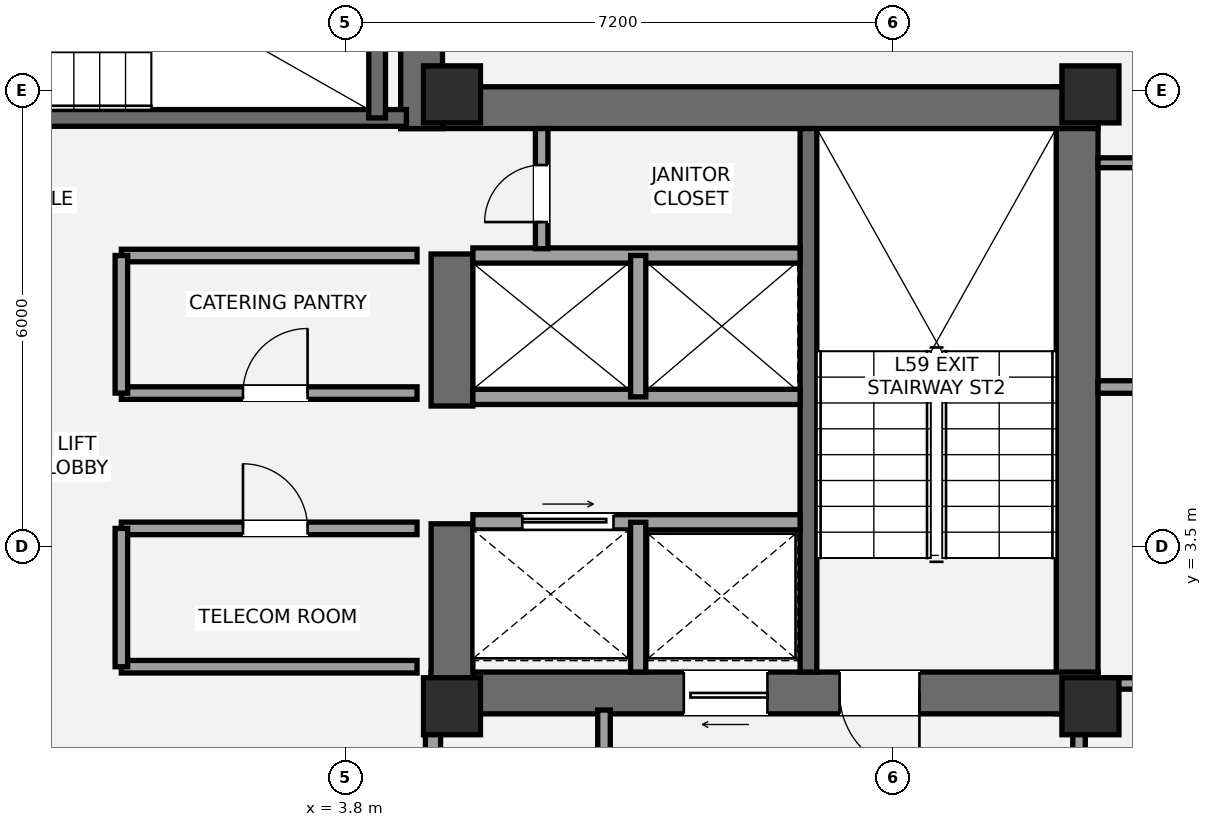
"""IFC4 building model, lengths in metres.
Left out: names, types, materials, properties, quantities, classifications, styles, units other than length and angle.
Written with IfcOpenShell. Run it as: python <this file> out.ifc"""

import sys

from ifc_helpers import new_model, si_unit, direction, frame, frame_2d, origin, origin_2d, place, context, subcontext, project, spatial, rectangle, extrude, element, fill, save


model = new_model("IFC4")
c1 = context("Model", 3, precision=1e-05, world=origin(), true_north=direction((0.0, 1.0)))
c2 = subcontext(c1, "Body", "Model", "MODEL_VIEW")
j1 = project(units=[si_unit("LENGTHUNIT", "METRE"), si_unit("PLANEANGLEUNIT", "RADIAN")], contexts=[c1])
p1 = place(None, origin())
s1 = spatial("IfcSite", under=j1, at=p1, CompositionType="ELEMENT")
p2 = place(p1, origin())
s2 = spatial("IfcBuilding", under=s1, at=p2, CompositionType="ELEMENT")
p3 = place(p2, frame((0.0, 0.0, 213.15)))
s3 = spatial("IfcBuildingStorey", under=s2, at=p3, CompositionType="ELEMENT", Elevation=213.15)
p4 = place(p3, frame((13.425, 1.3, 0.0), z_axis=(0.0, 0.0, 1.0), x_axis=(0.0, 1.0, 0.0)))
e1 = element("IfcWall", 1, at=p4, inside=s3, PredefinedType="SHEAR", context=c2, shape_type="SweptSolid", body=[
    extrude(rectangle(XDim=8.25, YDim=0.55, at=frame_2d((4.125, 0.0))), origin(), (0.0, 0.0, 1.0), 3.15),
])
p5 = place(p3, frame((4.525, 9.275, 0.0), z_axis=(0.0, 0.0, 1.0), x_axis=(1.0, 0.0, 0.0)))
e2 = element("IfcWall", 2, at=p5, inside=s3, PredefinedType="SHEAR", context=c2, shape_type="SweptSolid", body=[
    extrude(rectangle(XDim=9.175, YDim=0.55, at=frame_2d((4.587, 0.0))), origin(), (0.0, 0.0, 1.0), 3.15),
])
p6 = place(p3, frame((13.7, 1.575, 0.0), z_axis=(0.0, 0.0, 1.0), x_axis=(-1.0, 0.0, 0.0)))
e3 = element("IfcWall", 3, at=p6, inside=s3, PredefinedType="SHEAR", context=c2, shape_type="SweptSolid", body=[
    extrude(rectangle(XDim=8.775, YDim=0.55, at=frame_2d((4.387, 0.0))), origin(), (0.0, 0.0, 1.0), 3.15),
])
p7 = place(p6, frame((2.35, 0.0, 0.0)))
e4 = element("IfcOpeningElement", 4, at=p7, cuts=e3, PredefinedType="OPENING", context=c2, shape_type="SweptSolid", body=[
    extrude(rectangle(XDim=1.05, YDim=2.15, at=frame_2d((0.525, 1.075))), frame((0.0, 0.285, 0.0), z_axis=(0.0, -1.0, 0.0), x_axis=(1.0, 0.0, 0.0)), (0.0, 0.0, 1.0), 0.57),
])
p8 = place(p6, frame((4.35, 0.0, 0.0)))
e5 = element("IfcOpeningElement", 5, at=p8, cuts=e3, PredefinedType="OPENING", context=c2, shape_type="SweptSolid", body=[
    extrude(rectangle(XDim=1.1, YDim=2.2, at=frame_2d((0.55, 1.1))), frame((0.0, 0.285, 0.0), z_axis=(0.0, -1.0, 0.0), x_axis=(1.0, 0.0, 0.0)), (0.0, 0.0, 1.0), 0.57),
])
p9 = place(p3, frame((5.2, 1.3, 0.0), z_axis=(0.0, 0.0, 1.0), x_axis=(0.0, 1.0, 0.0)))
e6 = element("IfcWall", 6, at=p9, inside=s3, PredefinedType="SHEAR", context=c2, shape_type="SweptSolid", body=[
    extrude(rectangle(XDim=2.5, YDim=0.55, at=frame_2d((1.25, 0.0))), origin(), (0.0, 0.0, 1.0), 3.15),
])
p10 = place(p3, frame((5.2, 5.35, 0.0), z_axis=(0.0, 0.0, 1.0), x_axis=(0.0, 1.0, 0.0)))
e7 = element("IfcWall", 7, at=p10, inside=s3, PredefinedType="SHEAR", context=c2, shape_type="SweptSolid", body=[
    extrude(rectangle(XDim=2.0, YDim=0.55, at=frame_2d((1.0, 0.0))), origin(), (0.0, 0.0, 1.0), 3.15),
])
p11 = place(p3, frame((9.89, 1.85, 0.0), z_axis=(0.0, 0.0, 1.0), x_axis=(0.0, 1.0, 0.0)))
e8 = element("IfcWall", 8, at=p11, inside=s3, PredefinedType="SHEAR", context=c2, shape_type="SweptSolid", body=[
    extrude(rectangle(XDim=7.15, YDim=0.22, at=frame_2d((3.575, 0.0))), origin(), (0.0, 0.0, 1.0), 3.15),
])
p12 = place(p3, frame((4.8, 9.0, 0.0), z_axis=(0.0, 0.0, 1.0), x_axis=(0.0, 1.0, 0.0)))
e9 = element("IfcWall", 9, at=p12, inside=s3, PredefinedType="SHEAR", context=c2, shape_type="SweptSolid", body=[
    extrude(rectangle(XDim=3.95, YDim=0.55, at=frame_2d((1.975, 0.0))), origin(), (0.0, 0.0, 1.0), 3.15),
])
p13 = place(p3, frame((-4.7, 9.14, 0.0), z_axis=(0.0, 0.0, 1.0), x_axis=(1.0, 0.0, 0.0)))
e10 = element("IfcWall", 10, at=p13, inside=s3, PredefinedType="SHEAR", context=c2, shape_type="SweptSolid", body=[
    extrude(rectangle(XDim=9.3, YDim=0.22, at=frame_2d((4.65, 0.0))), origin(), (0.0, 0.0, 1.0), 3.15),
])
p14 = place(p13, frame((1.15, 0.0, 0.0)))
e11 = element("IfcOpeningElement", 11, at=p14, cuts=e10, PredefinedType="OPENING", context=c2, shape_type="SweptSolid", body=[
    extrude(rectangle(XDim=1.05, YDim=2.15, at=frame_2d((0.525, 1.075))), frame((0.0, 0.12, 0.0), z_axis=(0.0, -1.0, 0.0), x_axis=(1.0, 0.0, 0.0)), (0.0, 0.0, 1.0), 0.24),
])
p15 = place(p3, frame((4.215, 9.14, 0.0), z_axis=(0.0, 0.0, 1.0), x_axis=(0.0, 1.0, 0.0)))
e12 = element("IfcWall", 12, at=p15, inside=s3, PredefinedType="SHEAR", context=c2, shape_type="SweptSolid", body=[
    extrude(rectangle(XDim=3.26, YDim=0.22, at=frame_2d((1.63, 0.0))), origin(), (0.0, 0.0, 1.0), 3.15),
])
for number, where, z_axis, x_axis in (
    (13, (5.2, 1.4, 0.0), (0.0, 0.0, 1.0), (1.0, 0.0, 0.0)),
    (14, (5.2, 9.45, 0.0), (0.0, 0.0, 1.0), (1.0, 0.0, 0.0)),
    (15, (13.6, 1.4, 0.0), (0.0, 0.0, 1.0), (1.0, 0.0, 0.0)),
    (16, (13.6, 9.45, 0.0), (0.0, 0.0, 1.0), (1.0, 0.0, 0.0)),
):
    element("IfcColumn", number, at=place(p3, frame(where, z_axis=z_axis, x_axis=x_axis)), inside=s3, PredefinedType="PILASTER", context=c2, shape_type="SweptSolid", body=[
        extrude(rectangle(XDim=0.75, YDim=0.75, at=origin_2d()), origin(), (0.0, 0.0, 1.0), 3.15),
    ])
p16 = place(p3, frame((13.907, 11.413, 0.0), z_axis=(0.0, 0.0, 1.0), x_axis=(0.827592777121, -0.561328954586, 0.0)))
e17 = element("IfcWall", 17, at=p16, inside=s3, PredefinedType="STANDARD", context=c2, shape_type="SweptSolid", body=[
    extrude(rectangle(XDim=3.704, YDim=0.44, at=frame_2d((1.852, 0.0))), origin(), (0.0, 0.0, 1.0), 2.336),
])
p17 = place(p16, frame((1.958, 0.0, 0.58)))
e18 = element("IfcOpeningElement", 18, at=p17, cuts=e17, PredefinedType="OPENING", context=c2, shape_type="SweptSolid", body=[
    extrude(rectangle(XDim=1.4, YDim=1.55, at=frame_2d((0.7, 0.775))), frame((0.0, 0.23, 0.0), z_axis=(0.0, -1.0, 0.0), x_axis=(1.0, 0.0, 0.0)), (0.0, 0.0, 1.0), 0.46),
])
p18 = place(p3, frame((7.2, -2.15, 0.0), z_axis=(0.0, 0.0, 1.0), x_axis=(0.0, 1.0, 0.0)))
e19 = element("IfcWall", 19, at=p18, inside=s3, PredefinedType="PARTITIONING", context=c2, shape_type="SweptSolid", body=[
    extrude(rectangle(XDim=3.5, YDim=0.165, at=frame_2d((1.75, 0.0))), origin(), (0.0, 0.0, 1.0), 2.423),
])
p19 = place(p3, frame((13.45, -2.15, 0.0), z_axis=(0.0, 0.0, 1.0), x_axis=(0.0, 1.0, 0.0)))
e20 = element("IfcWall", 20, at=p19, inside=s3, PredefinedType="PARTITIONING", context=c2, shape_type="SweptSolid", body=[
    extrude(rectangle(XDim=3.5, YDim=0.165, at=frame_2d((1.75, 0.0))), origin(), (0.0, 0.0, 1.0), 2.423),
])
p20 = place(p19, frame((0.67, 0.0, 0.0)))
e21 = element("IfcOpeningElement", 21, at=p20, cuts=e20, PredefinedType="OPENING", context=c2, shape_type="SweptSolid", body=[
    extrude(rectangle(XDim=1.05, YDim=2.15, at=frame_2d((0.525, 1.075))), frame((0.0, 0.093, 0.0), z_axis=(0.0, -1.0, 0.0), x_axis=(1.0, 0.0, 0.0)), (0.0, 0.0, 1.0), 0.185),
])
p21 = place(p3, frame((4.95, -2.15, 0.0), z_axis=(0.0, 0.0, 1.0), x_axis=(0.0, 1.0, 0.0)))
e22 = element("IfcWall", 22, at=p21, inside=s3, PredefinedType="SOLIDWALL", context=c2, shape_type="SweptSolid", body=[
    extrude(rectangle(XDim=3.5, YDim=0.2, at=frame_2d((1.75, 0.0))), origin(), (0.0, 0.0, 1.0), 2.423),
])
p22 = place(p21, frame((0.95, 0.0, 0.0)))
e23 = element("IfcOpeningElement", 23, at=p22, cuts=e22, PredefinedType="OPENING", context=c2, shape_type="SweptSolid", body=[
    extrude(rectangle(XDim=0.75, YDim=2.1, at=frame_2d((0.375, 1.05))), frame((0.0, 0.11, 0.0), z_axis=(0.0, -1.0, 0.0), x_axis=(1.0, 0.0, 0.0)), (0.0, 0.0, 1.0), 0.22),
])
p23 = place(p3, frame((5.475, 3.82, 0.0), z_axis=(0.0, 0.0, 1.0), x_axis=(1.0, 0.0, 0.0)))
e24 = element("IfcWall", 24, at=p23, inside=s3, PredefinedType="SOLIDWALL", context=c2, shape_type="SweptSolid", body=[
    extrude(rectangle(XDim=4.305, YDim=0.2, at=frame_2d((2.152, 0.0))), origin(), (0.0, 0.0, 1.0), 2.97),
])
p24 = place(p23, frame((0.65, 0.0, 0.0)))
e25 = element("IfcOpeningElement", 25, at=p24, cuts=e24, PredefinedType="OPENING", context=c2, shape_type="SweptSolid", body=[
    extrude(rectangle(XDim=1.2, YDim=2.2, at=frame_2d((0.6, 1.1))), frame((0.0, 0.11, 0.0), z_axis=(0.0, -1.0, 0.0), x_axis=(1.0, 0.0, 0.0)), (0.0, 0.0, 1.0), 0.22),
])
p25 = place(p3, frame((7.65, 1.85, 0.0), z_axis=(0.0, 0.0, 1.0), x_axis=(0.0, 1.0, 0.0)))
e26 = element("IfcWall", 26, at=p25, inside=s3, PredefinedType="SOLIDWALL", context=c2, shape_type="SweptSolid", body=[
    extrude(rectangle(XDim=1.97, YDim=0.2, at=frame_2d((0.985, 0.0))), origin(), (0.0, 0.0, 1.0), 2.97),
])
for number, where, z_axis, x_axis in (
    (27, (5.475, 5.47, 0.0), (0.0, 0.0, 1.0), (1.0, 0.0, 0.0)),
    (28, (5.475, 7.33, 0.0), (0.0, 0.0, 1.0), (1.0, 0.0, 0.0)),
):
    element("IfcWall", number, at=place(p3, frame(where, z_axis=z_axis, x_axis=x_axis)), inside=s3, PredefinedType="SOLIDWALL", context=c2, shape_type="SweptSolid", body=[
        extrude(rectangle(XDim=4.305, YDim=0.2, at=frame_2d((2.152, 0.0))), origin(), (0.0, 0.0, 1.0), 2.97),
    ])
p26 = place(p3, frame((7.65, 5.47, 0.0), z_axis=(0.0, 0.0, 1.0), x_axis=(0.0, 1.0, 0.0)))
e29 = element("IfcWall", 29, at=p26, inside=s3, PredefinedType="SOLIDWALL", context=c2, shape_type="SweptSolid", body=[
    extrude(rectangle(XDim=1.86, YDim=0.2, at=frame_2d((0.93, 0.0))), origin(), (0.0, 0.0, 1.0), 2.97),
])
p27 = place(p3, frame((0.85, 1.92, 0.0), z_axis=(0.0, 0.0, 1.0), x_axis=(1.0, 0.0, 0.0)))
e30 = element("IfcWall", 30, at=p27, inside=s3, PredefinedType="PARTITIONING", context=c2, shape_type="SweptSolid", body=[
    extrude(rectangle(XDim=3.89, YDim=0.165, at=frame_2d((1.945, 0.0))), origin(), (0.0, 0.0, 1.0), 2.11),
])
p28 = place(p3, frame((0.85, 3.74, 0.0), z_axis=(0.0, 0.0, 1.0), x_axis=(1.0, 0.0, 0.0)))
e31 = element("IfcWall", 31, at=p28, inside=s3, PredefinedType="PARTITIONING", context=c2, shape_type="SweptSolid", body=[
    extrude(rectangle(XDim=3.89, YDim=0.165, at=frame_2d((1.945, 0.0))), origin(), (0.0, 0.0, 1.0), 2.97),
])
p29 = place(p28, frame((1.6, 0.0, 0.0)))
e32 = element("IfcOpeningElement", 32, at=p29, cuts=e31, PredefinedType="OPENING", context=c2, shape_type="SweptSolid", body=[
    extrude(rectangle(XDim=0.85, YDim=2.1, at=frame_2d((0.425, 1.05))), frame((0.0, 0.093, 0.0), z_axis=(0.0, -1.0, 0.0), x_axis=(1.0, 0.0, 0.0)), (0.0, 0.0, 1.0), 0.185),
])
p30 = place(p3, frame((0.85, 1.92, 0.0), z_axis=(0.0, 0.0, 1.0), x_axis=(0.0, 1.0, 0.0)))
e33 = element("IfcWall", 33, at=p30, inside=s3, PredefinedType="PARTITIONING", context=c2, shape_type="SweptSolid", body=[
    extrude(rectangle(XDim=1.82, YDim=0.165, at=frame_2d((0.91, 0.0))), origin(), (0.0, 0.0, 1.0), 2.97),
])
p31 = place(p3, frame((0.85, 5.52, 0.0), z_axis=(0.0, 0.0, 1.0), x_axis=(1.0, 0.0, 0.0)))
e34 = element("IfcWall", 34, at=p31, inside=s3, PredefinedType="PARTITIONING", context=c2, shape_type="SweptSolid", body=[
    extrude(rectangle(XDim=3.89, YDim=0.165, at=frame_2d((1.945, 0.0))), origin(), (0.0, 0.0, 1.0), 2.97),
])
p32 = place(p31, frame((1.6, 0.0, 0.0)))
e35 = element("IfcOpeningElement", 35, at=p32, cuts=e34, PredefinedType="OPENING", context=c2, shape_type="SweptSolid", body=[
    extrude(rectangle(XDim=0.85, YDim=2.1, at=frame_2d((0.425, 1.05))), frame((0.0, 0.093, 0.0), z_axis=(0.0, -1.0, 0.0), x_axis=(1.0, 0.0, 0.0)), (0.0, 0.0, 1.0), 0.185),
])
p33 = place(p3, frame((0.85, 7.33, 0.0), z_axis=(0.0, 0.0, 1.0), x_axis=(1.0, 0.0, 0.0)))
e36 = element("IfcWall", 36, at=p33, inside=s3, PredefinedType="PARTITIONING", context=c2, shape_type="SweptSolid", body=[
    extrude(rectangle(XDim=3.89, YDim=0.165, at=frame_2d((1.945, 0.0))), origin(), (0.0, 0.0, 1.0), 2.97),
])
p34 = place(p3, frame((0.85, 5.52, 0.0), z_axis=(0.0, 0.0, 1.0), x_axis=(0.0, 1.0, 0.0)))
e37 = element("IfcWall", 37, at=p34, inside=s3, PredefinedType="PARTITIONING", context=c2, shape_type="SweptSolid", body=[
    extrude(rectangle(XDim=1.81, YDim=0.165, at=frame_2d((0.905, 0.0))), origin(), (0.0, 0.0, 1.0), 2.97),
])
p35 = place(p3, frame((6.38, 7.42, 0.0), z_axis=(0.0, 0.0, 1.0), x_axis=(0.0, 1.0, 0.0)))
e38 = element("IfcWall", 38, at=p35, inside=s3, PredefinedType="PARTITIONING", context=c2, shape_type="SweptSolid", body=[
    extrude(rectangle(XDim=1.58, YDim=0.165, at=frame_2d((0.79, 0.0))), origin(), (0.0, 0.0, 1.0), 2.97),
])
p36 = place(p35, frame((0.35, 0.0, 0.0)))
e39 = element("IfcOpeningElement", 39, at=p36, cuts=e38, PredefinedType="OPENING", context=c2, shape_type="SweptSolid", body=[
    extrude(rectangle(XDim=0.75, YDim=2.1, at=frame_2d((0.375, 1.05))), frame((0.0, 0.093, 0.0), z_axis=(0.0, -1.0, 0.0), x_axis=(1.0, 0.0, 0.0)), (0.0, 0.0, 1.0), 0.185),
])
p37 = place(p3, frame((13.7, 5.6, 0.0), z_axis=(0.0, 0.0, 1.0), x_axis=(1.0, 0.0, 0.0)))
e40 = element("IfcWall", 40, at=p37, inside=s3, PredefinedType="PARTITIONING", context=c2, shape_type="SweptSolid", body=[
    extrude(rectangle(XDim=7.053, YDim=0.165, at=frame_2d((3.527, 0.0))), origin(), (0.0, 0.0, 1.0), 2.423),
])
p38 = place(p37, frame((3.57, 0.0, 0.0)))
e41 = element("IfcOpeningElement", 41, at=p38, cuts=e40, PredefinedType="OPENING", context=c2, shape_type="SweptSolid", body=[
    extrude(rectangle(XDim=0.85, YDim=2.1, at=frame_2d((0.425, 1.05))), frame((0.0, 0.093, 0.0), z_axis=(0.0, -1.0, 0.0), x_axis=(1.0, 0.0, 0.0)), (0.0, 0.0, 1.0), 0.185),
])
p39 = place(p3, frame((13.7, 1.7, 0.0), z_axis=(0.0, 0.0, 1.0), x_axis=(1.0, 0.0, 0.0)))
e42 = element("IfcWall", 42, at=p39, inside=s3, PredefinedType="PLUMBINGWALL", context=c2, shape_type="SweptSolid", body=[
    extrude(rectangle(XDim=4.25, YDim=0.15, at=frame_2d((2.125, 0.0))), origin(), (0.0, 0.0, 1.0), 2.423),
])
p40 = place(p39, frame((0.55, 0.0, 0.0)))
e43 = element("IfcOpeningElement", 43, at=p40, cuts=e42, PredefinedType="OPENING", context=c2, shape_type="SweptSolid", body=[
    extrude(rectangle(XDim=0.8, YDim=2.1, at=frame_2d((0.4, 1.05))), frame((0.0, 0.085, 0.0), z_axis=(0.0, -1.0, 0.0), x_axis=(1.0, 0.0, 0.0)), (0.0, 0.0, 1.0), 0.17),
])
p41 = place(p39, frame((2.15, 0.0, 0.0)))
e44 = element("IfcOpeningElement", 44, at=p41, cuts=e42, PredefinedType="OPENING", context=c2, shape_type="SweptSolid", body=[
    extrude(rectangle(XDim=0.85, YDim=2.1, at=frame_2d((0.425, 1.05))), frame((0.0, 0.085, 0.0), z_axis=(0.0, -1.0, 0.0), x_axis=(1.0, 0.0, 0.0)), (0.0, 0.0, 1.0), 0.17),
])
p42 = place(p3, frame((13.7, 8.55, 0.0), z_axis=(0.0, 0.0, 1.0), x_axis=(1.0, 0.0, 0.0)))
e45 = element("IfcWall", 45, at=p42, inside=s3, PredefinedType="PARTITIONING", context=c2, shape_type="SweptSolid", body=[
    extrude(rectangle(XDim=3.882, YDim=0.13, at=frame_2d((1.941, 0.0))), origin(), (0.0, 0.0, 1.0), 2.423),
])
p43 = place(p42, frame((1.72, 0.0, 0.0)))
e46 = element("IfcOpeningElement", 46, at=p43, cuts=e45, PredefinedType="OPENING", context=c2, shape_type="SweptSolid", body=[
    extrude(rectangle(XDim=0.85, YDim=2.1, at=frame_2d((0.425, 1.05))), frame((0.0, 0.075, 0.0), z_axis=(0.0, -1.0, 0.0), x_axis=(1.0, 0.0, 0.0)), (0.0, 0.0, 1.0), 0.15),
])
p44 = place(p7, origin())
e47 = element("IfcDoor", 47, at=p44, inside=s3, OperationType="SINGLE_SWING_LEFT", PredefinedType="DOOR", context=c2, shape_type="SweptSolid", body=[
    extrude(rectangle(XDim=1.05, YDim=2.15, at=frame_2d((0.525, 1.075))), frame((0.0, 0.025, 0.0), z_axis=(0.0, -1.0, 0.0), x_axis=(1.0, 0.0, 0.0)), (0.0, 0.0, 1.0), 0.05),
])
fill(e4, e47)
p45 = place(p8, origin())
e48 = element("IfcDoor", 48, at=p45, inside=s3, OperationType="SLIDING_TO_LEFT", PredefinedType="DOOR", context=c2, shape_type="SweptSolid", body=[
    extrude(rectangle(XDim=1.1, YDim=2.2, at=frame_2d((0.55, 1.1))), frame((0.0, 0.025, 0.0), z_axis=(0.0, -1.0, 0.0), x_axis=(1.0, 0.0, 0.0)), (0.0, 0.0, 1.0), 0.05),
])
fill(e5, e48)
p46 = place(p24, origin())
e49 = element("IfcDoor", 49, at=p46, inside=s3, OperationType="SLIDING_TO_RIGHT", PredefinedType="DOOR", context=c2, shape_type="SweptSolid", body=[
    extrude(rectangle(XDim=1.2, YDim=2.2, at=frame_2d((0.6, 1.1))), frame((0.0, 0.025, 0.0), z_axis=(0.0, -1.0, 0.0), x_axis=(1.0, 0.0, 0.0)), (0.0, 0.0, 1.0), 0.05),
])
fill(e25, e49)
p47 = place(p29, origin())
e50 = element("IfcDoor", 50, at=p47, inside=s3, OperationType="SINGLE_SWING_LEFT", PredefinedType="DOOR", context=c2, shape_type="SweptSolid", body=[
    extrude(rectangle(XDim=0.85, YDim=2.1, at=frame_2d((0.425, 1.05))), frame((0.0, 0.025, 0.0), z_axis=(0.0, -1.0, 0.0), x_axis=(1.0, 0.0, 0.0)), (0.0, 0.0, 1.0), 0.05),
])
fill(e32, e50)
p48 = place(p32, origin())
e51 = element("IfcDoor", 51, at=p48, inside=s3, OperationType="SINGLE_SWING_RIGHT", PredefinedType="DOOR", context=c2, shape_type="SweptSolid", body=[
    extrude(rectangle(XDim=0.85, YDim=2.1, at=frame_2d((0.425, 1.05))), frame((0.0, 0.025, 0.0), z_axis=(0.0, -1.0, 0.0), x_axis=(1.0, 0.0, 0.0)), (0.0, 0.0, 1.0), 0.05),
])
fill(e35, e51)
p49 = place(p36, origin())
e52 = element("IfcDoor", 52, at=p49, inside=s3, OperationType="SINGLE_SWING_LEFT", PredefinedType="DOOR", context=c2, shape_type="SweptSolid", body=[
    extrude(rectangle(XDim=0.75, YDim=2.1, at=frame_2d((0.375, 1.05))), frame((0.0, 0.025, 0.0), z_axis=(0.0, -1.0, 0.0), x_axis=(1.0, 0.0, 0.0)), (0.0, 0.0, 1.0), 0.05),
])
fill(e39, e52)
save(model, sys.argv[1])
